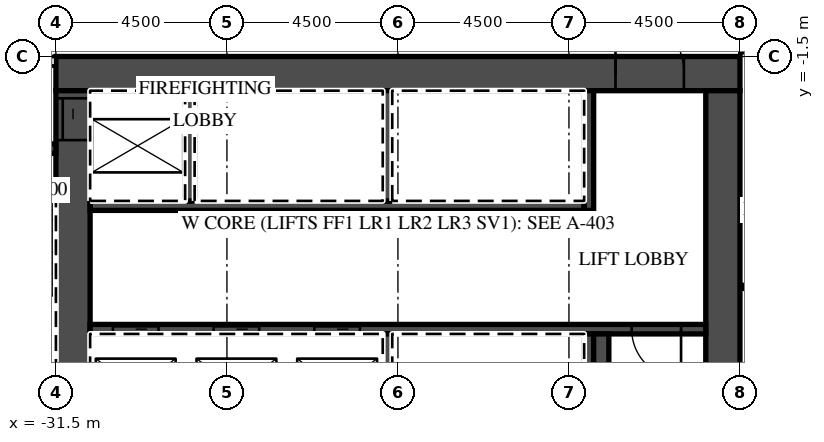
"""IFC4 building model, lengths in metres.
Left out: names, types, materials, properties, quantities, classifications, styles, units other than length and angle.
Written with IfcOpenShell. Run it as: python <this file> out.ifc"""

import sys

from ifc_helpers import new_model, si_unit, direction, frame, frame_2d, origin, place, context, subcontext, project, spatial, rectangle, extrude, element, fill, save


model = new_model("IFC4")
c1 = context("Model", 3, precision=1e-05, world=origin(), true_north=direction((0.0, 1.0)))
c2 = subcontext(c1, "Body", "Model", "MODEL_VIEW")
j1 = project(units=[si_unit("LENGTHUNIT", "METRE"), si_unit("PLANEANGLEUNIT", "RADIAN")], contexts=[c1])
p1 = place(None, origin())
s1 = spatial("IfcSite", under=j1, at=p1, CompositionType="ELEMENT")
p2 = place(p1, origin())
s2 = spatial("IfcBuilding", under=s1, at=p2, CompositionType="ELEMENT")
p3 = place(p2, frame((0.0, 0.0, 137.2)))
s3 = spatial("IfcBuildingStorey", under=s2, at=p3, CompositionType="ELEMENT", Elevation=137.2)
p4 = place(p3, frame((-13.5, -1.3, 0.0), z_axis=(0.0, 0.0, 1.0), x_axis=(1.0, 0.0, 0.0)))
e1 = element("IfcWall", 1, at=p4, inside=s3, PredefinedType="PARTITIONING", context=c2, shape_type="SweptSolid", body=[
    extrude(rectangle(XDim=60.932, YDim=0.2, at=frame_2d((30.466, 0.0))), origin(), (0.0, 0.0, 1.0), 3.02),
])
p5 = place(p4, frame((2.925, 0.0, 0.0)))
e2 = element("IfcOpeningElement", 2, at=p5, cuts=e1, PredefinedType="OPENING", context=c2, shape_type="SweptSolid", body=[
    extrude(rectangle(XDim=1.0, YDim=2.1, at=frame_2d((0.5, 1.05))), frame((0.0, 0.11, 0.0), z_axis=(0.0, -1.0, 0.0), x_axis=(1.0, 0.0, 0.0)), (0.0, 0.0, 1.0), 0.22),
])
p6 = place(p4, frame((7.45, 0.0, 0.0)))
e3 = element("IfcOpeningElement", 3, at=p6, cuts=e1, PredefinedType="OPENING", context=c2, shape_type="SweptSolid", body=[
    extrude(rectangle(XDim=1.0, YDim=2.1, at=frame_2d((0.5, 1.05))), frame((0.0, 0.11, 0.0), z_axis=(0.0, -1.0, 0.0), x_axis=(1.0, 0.0, 0.0)), (0.0, 0.0, 1.0), 0.22),
])
p7 = place(p4, frame((9.55, 0.0, 0.0)))
e4 = element("IfcOpeningElement", 4, at=p7, cuts=e1, PredefinedType="OPENING", context=c2, shape_type="SweptSolid", body=[
    extrude(rectangle(XDim=1.0, YDim=2.1, at=frame_2d((0.5, 1.05))), frame((0.0, 0.11, 0.0), z_axis=(0.0, -1.0, 0.0), x_axis=(1.0, 0.0, 0.0)), (0.0, 0.0, 1.0), 0.22),
])
p8 = place(p4, frame((15.938, 0.0, 0.0)))
e5 = element("IfcOpeningElement", 5, at=p8, cuts=e1, PredefinedType="OPENING", context=c2, shape_type="SweptSolid", body=[
    extrude(rectangle(XDim=1.2, YDim=2.1, at=frame_2d((0.6, 1.05))), frame((0.0, 0.11, 0.0), z_axis=(0.0, -1.0, 0.0), x_axis=(1.0, 0.0, 0.0)), (0.0, 0.0, 1.0), 0.22),
])
p9 = place(p4, frame((24.938, 0.0, 0.0)))
e6 = element("IfcOpeningElement", 6, at=p9, cuts=e1, PredefinedType="OPENING", context=c2, shape_type="SweptSolid", body=[
    extrude(rectangle(XDim=1.2, YDim=2.1, at=frame_2d((0.6, 1.05))), frame((0.0, 0.11, 0.0), z_axis=(0.0, -1.0, 0.0), x_axis=(1.0, 0.0, 0.0)), (0.0, 0.0, 1.0), 0.22),
])
p10 = place(p4, frame((32.075, 0.0, 0.0)))
e7 = element("IfcOpeningElement", 7, at=p10, cuts=e1, PredefinedType="OPENING", context=c2, shape_type="SweptSolid", body=[
    extrude(rectangle(XDim=1.0, YDim=2.1, at=frame_2d((0.5, 1.05))), frame((0.0, 0.11, 0.0), z_axis=(0.0, -1.0, 0.0), x_axis=(1.0, 0.0, 0.0)), (0.0, 0.0, 1.0), 0.22),
])
p11 = place(p4, frame((36.55, 0.0, 0.0)))
e8 = element("IfcOpeningElement", 8, at=p11, cuts=e1, PredefinedType="OPENING", context=c2, shape_type="SweptSolid", body=[
    extrude(rectangle(XDim=1.0, YDim=2.1, at=frame_2d((0.5, 1.05))), frame((0.0, 0.11, 0.0), z_axis=(0.0, -1.0, 0.0), x_axis=(1.0, 0.0, 0.0)), (0.0, 0.0, 1.0), 0.22),
])
p12 = place(p4, frame((45.862, 0.0, 0.0)))
e9 = element("IfcOpeningElement", 9, at=p12, cuts=e1, PredefinedType="OPENING", context=c2, shape_type="SweptSolid", body=[
    extrude(rectangle(XDim=1.2, YDim=2.1, at=frame_2d((0.6, 1.05))), frame((0.0, 0.11, 0.0), z_axis=(0.0, -1.0, 0.0), x_axis=(1.0, 0.0, 0.0)), (0.0, 0.0, 1.0), 0.22),
])
p13 = place(p4, frame((50.075, 0.0, 0.0)))
e10 = element("IfcOpeningElement", 10, at=p13, cuts=e1, PredefinedType="OPENING", context=c2, shape_type="SweptSolid", body=[
    extrude(rectangle(XDim=1.0, YDim=2.1, at=frame_2d((0.5, 1.05))), frame((0.0, 0.11, 0.0), z_axis=(0.0, -1.0, 0.0), x_axis=(1.0, 0.0, 0.0)), (0.0, 0.0, 1.0), 0.22),
])
p14 = place(p4, frame((56.95, 0.0, 0.0)))
e11 = element("IfcOpeningElement", 11, at=p14, cuts=e1, PredefinedType="OPENING", context=c2, shape_type="SweptSolid", body=[
    extrude(rectangle(XDim=1.0, YDim=2.1, at=frame_2d((0.5, 1.05))), frame((0.0, 0.11, 0.0), z_axis=(0.0, -1.0, 0.0), x_axis=(1.0, 0.0, 0.0)), (0.0, 0.0, 1.0), 0.22),
])
p15 = place(p4, frame((59.882, 0.0, 0.0)))
e12 = element("IfcOpeningElement", 12, at=p15, cuts=e1, PredefinedType="OPENING", context=c2, shape_type="SweptSolid", body=[
    extrude(rectangle(XDim=0.9, YDim=2.1, at=frame_2d((0.45, 1.05))), frame((0.0, 0.11, 0.0), z_axis=(0.0, -1.0, 0.0), x_axis=(1.0, 0.0, 0.0)), (0.0, 0.0, 1.0), 0.22),
])
p16 = place(p3, frame((-31.5, -1.95, 0.0), z_axis=(0.0, 0.0, 1.0), x_axis=(1.0, 0.0, 0.0)))
e13 = element("IfcWall", 13, at=p16, inside=s3, PredefinedType="SHEAR", context=c2, shape_type="SweptSolid", body=[
    extrude(rectangle(XDim=18.0, YDim=0.9, at=frame_2d((9.0, 0.0))), origin(), (0.0, 0.0, 1.0), 3.02),
])
p17 = place(p16, frame((14.725, 0.0, 0.0)))
e14 = element("IfcOpeningElement", 14, at=p17, cuts=e13, PredefinedType="OPENING", context=c2, shape_type="SweptSolid", body=[
    extrude(rectangle(XDim=1.8, YDim=2.1, at=frame_2d((0.9, 1.05))), frame((0.0, 0.46, 0.0), z_axis=(0.0, -1.0, 0.0), x_axis=(1.0, 0.0, 0.0)), (0.0, 0.0, 1.0), 0.92),
])
p18 = place(p3, frame((-31.05, -15.2, 0.0), z_axis=(0.0, 0.0, 1.0), x_axis=(0.0, 1.0, 0.0)))
e15 = element("IfcWall", 15, at=p18, inside=s3, PredefinedType="SHEAR", context=c2, shape_type="SweptSolid", body=[
    extrude(rectangle(XDim=12.8, YDim=0.9, at=frame_2d((6.4, 0.0))), origin(), (0.0, 0.0, 1.0), 3.02),
])
p19 = place(p18, frame((11.5, 0.0, 0.0)))
e16 = element("IfcOpeningElement", 16, at=p19, cuts=e15, PredefinedType="OPENING", context=c2, shape_type="SweptSolid", body=[
    extrude(rectangle(XDim=1.1, YDim=2.1, at=frame_2d((0.55, 1.05))), frame((0.0, 0.46, 0.0), z_axis=(0.0, -1.0, 0.0), x_axis=(1.0, 0.0, 0.0)), (0.0, 0.0, 1.0), 0.92),
])
p20 = place(p3, frame((-13.95, -14.6, 0.0), z_axis=(0.0, 0.0, 1.0), x_axis=(0.0, 1.0, 0.0)))
e17 = element("IfcWall", 17, at=p20, inside=s3, PredefinedType="SHEAR", context=c2, shape_type="SweptSolid", body=[
    extrude(rectangle(XDim=12.2, YDim=0.9, at=frame_2d((6.1, 0.0))), origin(), (0.0, 0.0, 1.0), 3.02),
])
p21 = place(p3, frame((-30.6, -5.425, 0.0), z_axis=(0.0, 0.0, 1.0), x_axis=(1.0, 0.0, 0.0)))
e18 = element("IfcWall", 18, at=p21, inside=s3, PredefinedType="SHEAR", context=c2, shape_type="SweptSolid", body=[
    extrude(rectangle(XDim=13.0, YDim=0.25, at=frame_2d((6.5, 0.0))), origin(), (0.0, 0.0, 1.0), 3.02),
])
p22 = place(p3, frame((-17.475, -5.55, 0.0), z_axis=(0.0, 0.0, 1.0), x_axis=(0.0, 1.0, 0.0)))
e19 = element("IfcWall", 19, at=p22, inside=s3, PredefinedType="SHEAR", context=c2, shape_type="SweptSolid", body=[
    extrude(rectangle(XDim=3.15, YDim=0.25, at=frame_2d((1.575, 0.0))), origin(), (0.0, 0.0, 1.0), 3.02),
])
for number, where, z_axis, x_axis in (
    (20, (-27.975, -5.3, 0.0), (0.0, 0.0, 1.0), (0.0, 1.0, 0.0)),
    (21, (-22.775, -5.3, 0.0), (0.0, 0.0, 1.0), (0.0, 1.0, 0.0)),
):
    element("IfcWall", number, at=place(p3, frame(where, z_axis=z_axis, x_axis=x_axis)), inside=s3, PredefinedType="SHEAR", context=c2, shape_type="SweptSolid", body=[
        extrude(rectangle(XDim=2.9, YDim=0.25, at=frame_2d((1.45, 0.0))), origin(), (0.0, 0.0, 1.0), 3.02),
    ])
p23 = place(p3, frame((-30.6, -8.675, 0.0), z_axis=(0.0, 0.0, 1.0), x_axis=(1.0, 0.0, 0.0)))
e22 = element("IfcWall", 22, at=p23, inside=s3, PredefinedType="SHEAR", context=c2, shape_type="SweptSolid", body=[
    extrude(rectangle(XDim=16.2, YDim=0.25, at=frame_2d((8.1, 0.0))), origin(), (0.0, 0.0, 1.0), 3.02),
])
p24 = place(p23, frame((0.6, 0.0, 0.0)))
e23 = element("IfcOpeningElement", 23, at=p24, cuts=e22, PredefinedType="OPENING", context=c2, shape_type="SweptSolid", body=[
    extrude(rectangle(XDim=1.2, YDim=2.1, at=frame_2d((0.6, 1.05))), frame((0.0, 0.135, 0.0), z_axis=(0.0, -1.0, 0.0), x_axis=(1.0, 0.0, 0.0)), (0.0, 0.0, 1.0), 0.27),
])
p25 = place(p23, frame((3.25, 0.0, 0.0)))
e24 = element("IfcOpeningElement", 24, at=p25, cuts=e22, PredefinedType="OPENING", context=c2, shape_type="SweptSolid", body=[
    extrude(rectangle(XDim=1.2, YDim=2.1, at=frame_2d((0.6, 1.05))), frame((0.0, 0.135, 0.0), z_axis=(0.0, -1.0, 0.0), x_axis=(1.0, 0.0, 0.0)), (0.0, 0.0, 1.0), 0.27),
])
p26 = place(p23, frame((5.9, 0.0, 0.0)))
e25 = element("IfcOpeningElement", 25, at=p26, cuts=e22, PredefinedType="OPENING", context=c2, shape_type="SweptSolid", body=[
    extrude(rectangle(XDim=1.2, YDim=2.1, at=frame_2d((0.6, 1.05))), frame((0.0, 0.135, 0.0), z_axis=(0.0, -1.0, 0.0), x_axis=(1.0, 0.0, 0.0)), (0.0, 0.0, 1.0), 0.27),
])
p27 = place(p23, frame((14.25, 0.0, 0.0)))
e26 = element("IfcOpeningElement", 26, at=p27, cuts=e22, PredefinedType="OPENING", context=c2, shape_type="SweptSolid", body=[
    extrude(rectangle(XDim=1.3, YDim=2.1, at=frame_2d((0.65, 1.05))), frame((0.0, 0.135, 0.0), z_axis=(0.0, -1.0, 0.0), x_axis=(1.0, 0.0, 0.0)), (0.0, 0.0, 1.0), 0.27),
])
for number, where, z_axis, x_axis in (
    (27, (-17.475, -11.7, 0.0), (0.0, 0.0, 1.0), (0.0, 1.0, 0.0)),
    (28, (-22.775, -11.7, 0.0), (0.0, 0.0, 1.0), (0.0, 1.0, 0.0)),
):
    element("IfcWall", number, at=place(p3, frame(where, z_axis=z_axis, x_axis=x_axis)), inside=s3, PredefinedType="SHEAR", context=c2, shape_type="SweptSolid", body=[
        extrude(rectangle(XDim=2.9, YDim=0.25, at=frame_2d((1.45, 0.0))), origin(), (0.0, 0.0, 1.0), 3.02),
    ])
p28 = place(p3, frame((-17.15, -14.6, 0.0), z_axis=(0.0, 0.0, 1.0), x_axis=(0.0, 1.0, 0.0)))
e29 = element("IfcWall", 29, at=p28, inside=s3, PredefinedType="SHEAR", context=c2, shape_type="SweptSolid", body=[
    extrude(rectangle(XDim=5.8, YDim=0.4, at=frame_2d((2.9, 0.0))), origin(), (0.0, 0.0, 1.0), 3.02),
])
p29 = place(p3, frame((-39.035, -1.625, 0.0), z_axis=(0.0, 0.0, 1.0), x_axis=(1.0, 0.0, 0.0)))
e30 = element("IfcWall", 30, at=p29, inside=s3, PredefinedType="PARTITIONING", context=c2, shape_type="SweptSolid", body=[
    extrude(rectangle(XDim=7.535, YDim=0.25, at=frame_2d((3.768, 0.0))), origin(), (0.0, 0.0, 1.0), 3.02),
])
p30 = place(p29, frame((5.61, 0.0, 0.0)))
e31 = element("IfcOpeningElement", 31, at=p30, cuts=e30, PredefinedType="OPENING", context=c2, shape_type="SweptSolid", body=[
    extrude(rectangle(XDim=1.3, YDim=2.1, at=frame_2d((0.65, 1.05))), frame((0.0, 0.135, 0.0), z_axis=(0.0, -1.0, 0.0), x_axis=(1.0, 0.0, 0.0)), (0.0, 0.0, 1.0), 0.27),
])
p31 = place(p29, frame((3.185, 0.0, 0.0)))
e32 = element("IfcOpeningElement", 32, at=p31, cuts=e30, PredefinedType="OPENING", context=c2, shape_type="SweptSolid", body=[
    extrude(rectangle(XDim=1.1, YDim=2.1, at=frame_2d((0.55, 1.05))), frame((0.0, 0.135, 0.0), z_axis=(0.0, -1.0, 0.0), x_axis=(1.0, 0.0, 0.0)), (0.0, 0.0, 1.0), 0.27),
])
p32 = place(p3, frame((-34.05, -3.925, 0.0), z_axis=(0.0, 0.0, 1.0), x_axis=(1.0, 0.0, 0.0)))
e33 = element("IfcWall", 33, at=p32, inside=s3, PredefinedType="SHEAR", context=c2, shape_type="SweptSolid", body=[
    extrude(rectangle(XDim=2.55, YDim=0.25, at=frame_2d((1.275, 0.0))), origin(), (0.0, 0.0, 1.0), 3.02),
])
p33 = place(p32, frame((0.625, 0.0, 0.0)))
e34 = element("IfcOpeningElement", 34, at=p33, cuts=e33, PredefinedType="OPENING", context=c2, shape_type="SweptSolid", body=[
    extrude(rectangle(XDim=1.3, YDim=2.1, at=frame_2d((0.65, 1.05))), frame((0.0, 0.135, 0.0), z_axis=(0.0, -1.0, 0.0), x_axis=(1.0, 0.0, 0.0)), (0.0, 0.0, 1.0), 0.27),
])
p34 = place(p24, origin())
e35 = element("IfcDoor", 35, at=p34, inside=s3, OperationType="SLIDING_TO_LEFT", PredefinedType="DOOR", context=c2, shape_type="SweptSolid", body=[
    extrude(rectangle(XDim=1.2, YDim=2.1, at=frame_2d((0.6, 1.05))), frame((0.0, 0.025, 0.0), z_axis=(0.0, -1.0, 0.0), x_axis=(1.0, 0.0, 0.0)), (0.0, 0.0, 1.0), 0.05),
])
fill(e23, e35)
p35 = place(p25, origin())
e36 = element("IfcDoor", 36, at=p35, inside=s3, OperationType="SLIDING_TO_RIGHT", PredefinedType="DOOR", context=c2, shape_type="SweptSolid", body=[
    extrude(rectangle(XDim=1.2, YDim=2.1, at=frame_2d((0.6, 1.05))), frame((0.0, 0.025, 0.0), z_axis=(0.0, -1.0, 0.0), x_axis=(1.0, 0.0, 0.0)), (0.0, 0.0, 1.0), 0.05),
])
fill(e24, e36)
p36 = place(p26, origin())
e37 = element("IfcDoor", 37, at=p36, inside=s3, OperationType="SLIDING_TO_RIGHT", PredefinedType="DOOR", context=c2, shape_type="SweptSolid", body=[
    extrude(rectangle(XDim=1.2, YDim=2.1, at=frame_2d((0.6, 1.05))), frame((0.0, 0.025, 0.0), z_axis=(0.0, -1.0, 0.0), x_axis=(1.0, 0.0, 0.0)), (0.0, 0.0, 1.0), 0.05),
])
fill(e25, e37)
p37 = place(p19, origin())
e38 = element("IfcDoor", 38, at=p37, inside=s3, OperationType="SLIDING_TO_RIGHT", PredefinedType="DOOR", context=c2, shape_type="SweptSolid", body=[
    extrude(rectangle(XDim=1.1, YDim=2.1, at=frame_2d((0.55, 1.05))), frame((0.0, 0.025, 0.0), z_axis=(0.0, -1.0, 0.0), x_axis=(1.0, 0.0, 0.0)), (0.0, 0.0, 1.0), 0.05),
])
fill(e16, e38)
p38 = place(p17, origin())
e39 = element("IfcDoor", 39, at=p38, inside=s3, OperationType="DOUBLE_DOOR_DOUBLE_SWING", PredefinedType="DOOR", context=c2, shape_type="SweptSolid", body=[
    extrude(rectangle(XDim=1.8, YDim=2.1, at=frame_2d((0.9, 1.05))), frame((0.0, 0.025, 0.0), z_axis=(0.0, -1.0, 0.0), x_axis=(1.0, 0.0, 0.0)), (0.0, 0.0, 1.0), 0.05),
])
fill(e14, e39)
p39 = place(p27, origin())
e40 = element("IfcDoor", 40, at=p39, inside=s3, OperationType="SINGLE_SWING_RIGHT", PredefinedType="DOOR", context=c2, shape_type="SweptSolid", body=[
    extrude(rectangle(XDim=1.3, YDim=2.1, at=frame_2d((0.65, 1.05))), frame((0.0, 0.025, 0.0), z_axis=(0.0, -1.0, 0.0), x_axis=(1.0, 0.0, 0.0)), (0.0, 0.0, 1.0), 0.05),
])
fill(e26, e40)
save(model, sys.argv[1])
